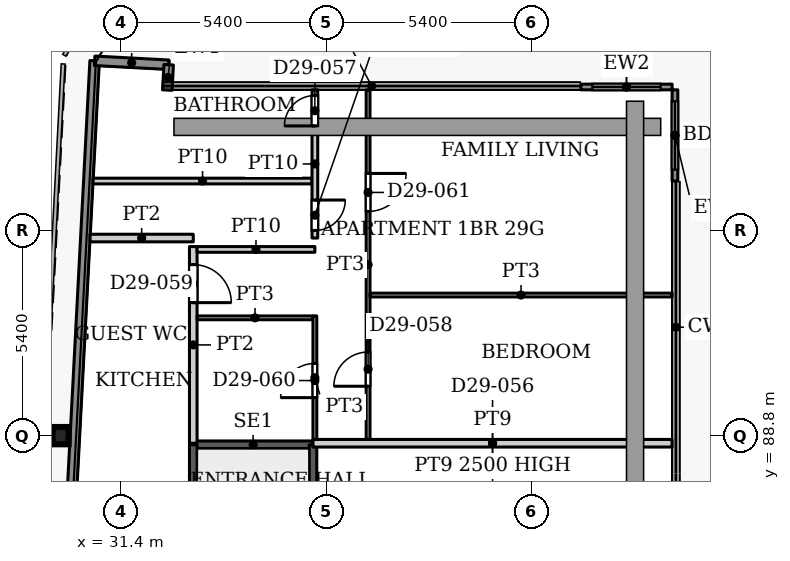
"""IFC4 building model, lengths in metres.
Left out: names, types, materials, properties, quantities, classifications, styles, units other than length and angle.
Written with IfcOpenShell. Run it as: python <this file> out.ifc"""

import sys

from ifc_helpers import new_model, si_unit, direction, frame, frame_2d, origin, origin_2d, place, context, subcontext, project, spatial, rectangle, i_section, extrude, source, transform, mapped, element, fill, save


model = new_model("IFC4")
c1 = context("Model", 3, precision=1e-05, world=origin(), true_north=direction((0.0, 1.0)))
c2 = subcontext(c1, "Body", "Model", "MODEL_VIEW")
j1 = project(units=[si_unit("LENGTHUNIT", "METRE"), si_unit("PLANEANGLEUNIT", "RADIAN")], contexts=[c1])
p1 = place(None, origin())
s1 = spatial("IfcSite", under=j1, at=p1, CompositionType="ELEMENT")
p2 = place(p1, origin())
s2 = spatial("IfcBuilding", under=s1, at=p2, CompositionType="ELEMENT")
p3 = place(p2, frame((0.0, 0.0, 125.3)))
s3 = spatial("IfcBuildingStorey", under=s2, at=p3, CompositionType="ELEMENT", Elevation=125.3)
p4 = place(p3, frame((29.811, 88.8, 0.0), z_axis=(0.0, 0.0, 1.0), x_axis=(1.0, 0.0, 0.0)))
e1 = element("IfcColumn", 1, at=p4, inside=s3, PredefinedType="COLUMN", context=c2, shape_type="SweptSolid", body=[
    extrude(i_section(OverallWidth=0.418, OverallDepth=0.455, WebThickness=0.042, FlangeThickness=0.068, FilletRadius=0.014, at=origin_2d()), origin(), (0.0, 0.0, 1.0), 3.9),
])
p5 = place(p3, frame((27.195, 31.969, 0.0), z_axis=(0.0, 0.0, 1.0), x_axis=(0.052554995867, 0.998618031286, 0.0)))
e2 = element("IfcWall", 2, at=p5, inside=s3, PredefinedType="SOLIDWALL", context=c2, shape_type="SweptSolid", body=[
    extrude(rectangle(XDim=66.787, YDim=0.25, at=frame_2d((33.394, 0.0))), origin(), (0.0, 0.0, 1.0), 3.75),
])
p6 = place(p3, frame((30.705, 98.664, 0.0), z_axis=(0.0, 0.0, 1.0), x_axis=(0.998577785791, -0.053314216913, 0.0)))
e3 = element("IfcWall", 3, at=p6, inside=s3, PredefinedType="SOLIDWALL", context=c2, shape_type="SweptSolid", body=[
    extrude(rectangle(XDim=1.951, YDim=0.25, at=frame_2d((0.975, 0.0))), origin(), (0.0, 0.0, 1.0), 3.75),
])
p7 = place(p3, frame((32.653, 98.56, 0.0), z_axis=(0.0, 0.0, 1.0), x_axis=(-0.054093451632, -0.998535877418, 0.0)))
e4 = element("IfcWall", 4, at=p7, inside=s3, PredefinedType="SOLIDWALL", context=c2, shape_type="SweptSolid", body=[
    extrude(rectangle(XDim=0.668, YDim=0.25, at=frame_2d((0.334, 0.0))), origin(), (0.0, 0.0, 1.0), 3.75),
])
p8 = place(p3, frame((43.5, 97.975, 0.0), z_axis=(0.0, 0.0, 1.0), x_axis=(1.0, 0.0, 0.0)))
e5 = element("IfcWall", 5, at=p8, inside=s3, PredefinedType="SOLIDWALL", context=c2, shape_type="SweptSolid", body=[
    extrude(rectangle(XDim=2.4, YDim=0.15, at=frame_2d((1.2, 0.0))), origin(), (0.0, 0.0, 1.0), 3.75),
])
p9 = place(p8, frame((0.3, 0.0, 0.0)))
e6 = element("IfcOpeningElement", 6, at=p9, cuts=e5, PredefinedType="OPENING", context=c2, shape_type="SweptSolid", body=[
    extrude(rectangle(XDim=1.8, YDim=2.4, at=frame_2d((0.9, 1.2))), frame((0.0, 0.085, 0.0), z_axis=(0.0, -1.0, 0.0), x_axis=(1.0, 0.0, 0.0)), (0.0, 0.0, 1.0), 0.17),
])
p10 = place(p3, frame((45.975, 97.9, 0.0), z_axis=(0.0, 0.0, 1.0), x_axis=(0.0, -1.0, 0.0)))
e7 = element("IfcWall", 7, at=p10, inside=s3, PredefinedType="SOLIDWALL", context=c2, shape_type="SweptSolid", body=[
    extrude(rectangle(XDim=2.4, YDim=0.15, at=frame_2d((1.2, 0.0))), origin(), (0.0, 0.0, 1.0), 3.75),
])
p11 = place(p10, frame((0.3, 0.0, 0.0)))
e8 = element("IfcOpeningElement", 8, at=p11, cuts=e7, PredefinedType="OPENING", context=c2, shape_type="SweptSolid", body=[
    extrude(rectangle(XDim=1.8, YDim=2.4, at=frame_2d((0.9, 1.2))), frame((0.0, 0.085, 0.0), z_axis=(0.0, -1.0, 0.0), x_axis=(1.0, 0.0, 0.0)), (0.0, 0.0, 1.0), 0.17),
])
p12 = place(p3, frame((33.3, 88.56, 0.0), z_axis=(0.0, 0.0, 1.0), x_axis=(1.0, 0.0, 0.0)))
e9 = element("IfcWall", 9, at=p12, inside=s3, PredefinedType="SHEAR", context=c2, shape_type="SweptSolid", body=[
    extrude(rectangle(XDim=3.15, YDim=0.2, at=frame_2d((1.575, 0.0))), origin(), (0.0, 0.0, 1.0), 3.9),
])
p13 = place(p3, frame((33.3, 79.4, 0.0), z_axis=(0.0, 0.0, 1.0), x_axis=(0.0, 1.0, 0.0)))
e10 = element("IfcWall", 10, at=p13, inside=s3, PredefinedType="SHEAR", context=c2, shape_type="SweptSolid", body=[
    extrude(rectangle(XDim=9.16, YDim=0.2, at=frame_2d((4.58, 0.0))), origin(), (0.0, 0.0, 1.0), 3.9),
])
p14 = place(p13, frame((0.35, 0.0, 0.0)))
e11 = element("IfcOpeningElement", 11, at=p14, cuts=e10, PredefinedType="OPENING", context=c2, shape_type="SweptSolid", body=[
    extrude(rectangle(XDim=1.1, YDim=2.2, at=frame_2d((0.55, 1.1))), frame((0.0, 0.11, 0.0), z_axis=(0.0, -1.0, 0.0), x_axis=(1.0, 0.0, 0.0)), (0.0, 0.0, 1.0), 0.22),
])
p15 = place(p3, frame((36.45, 79.4, 0.0), z_axis=(0.0, 0.0, 1.0), x_axis=(0.0, 1.0, 0.0)))
e12 = element("IfcWall", 12, at=p15, inside=s3, PredefinedType="SHEAR", context=c2, shape_type="SweptSolid", body=[
    extrude(rectangle(XDim=9.16, YDim=0.2, at=frame_2d((4.58, 0.0))), origin(), (0.0, 0.0, 1.0), 3.9),
])
p16 = place(p3, frame((30.664, 95.5, 0.0), z_axis=(0.0, 0.0, 1.0), x_axis=(1.0, 0.0, 0.0)))
e13 = element("IfcWall", 13, at=p16, inside=s3, PredefinedType="PARTITIONING", context=c2, shape_type="SweptSolid", body=[
    extrude(rectangle(XDim=5.761, YDim=0.15, at=frame_2d((2.88, 0.0))), origin(), (0.0, 0.0, 1.0), 3.6),
])
p17 = place(p3, frame((30.585, 94.0, 0.0), z_axis=(0.0, 0.0, 1.0), x_axis=(1.0, 0.0, 0.0)))
e14 = element("IfcWall", 14, at=p17, inside=s3, PredefinedType="PARTITIONING", context=c2, shape_type="SweptSolid", body=[
    extrude(rectangle(XDim=2.715, YDim=0.2, at=frame_2d((1.358, 0.0))), origin(), (0.0, 0.0, 1.0), 3.6),
])
p18 = place(p3, frame((33.3, 88.6, 0.0), z_axis=(0.0, 0.0, 1.0), x_axis=(0.0, 1.0, 0.0)))
e15 = element("IfcWall", 15, at=p18, inside=s3, PredefinedType="PARTITIONING", context=c2, shape_type="SweptSolid", body=[
    extrude(rectangle(XDim=5.175, YDim=0.2, at=frame_2d((2.587, 0.0))), origin(), (0.0, 0.0, 1.0), 3.6),
])
p19 = place(p18, frame((3.7, 0.0, 0.0)))
e16 = element("IfcOpeningElement", 16, at=p19, cuts=e15, PredefinedType="OPENING", context=c2, shape_type="SweptSolid", body=[
    extrude(rectangle(XDim=1.0, YDim=2.1, at=frame_2d((0.5, 1.05))), frame((0.0, 0.11, 0.0), z_axis=(0.0, -1.0, 0.0), x_axis=(1.0, 0.0, 0.0)), (0.0, 0.0, 1.0), 0.22),
])
p20 = place(p3, frame((33.4, 91.9, 0.0), z_axis=(0.0, 0.0, 1.0), x_axis=(1.0, 0.0, 0.0)))
e17 = element("IfcWall", 17, at=p20, inside=s3, PredefinedType="PARTITIONING", context=c2, shape_type="SweptSolid", body=[
    extrude(rectangle(XDim=3.05, YDim=0.1, at=frame_2d((1.525, 0.0))), origin(), (0.0, 0.0, 1.0), 3.6),
])
p21 = place(p3, frame((33.4, 93.7, 0.0), z_axis=(0.0, 0.0, 1.0), x_axis=(1.0, 0.0, 0.0)))
e18 = element("IfcWall", 18, at=p21, inside=s3, PredefinedType="PARTITIONING", context=c2, shape_type="SweptSolid", body=[
    extrude(rectangle(XDim=3.1, YDim=0.15, at=frame_2d((1.55, 0.0))), origin(), (0.0, 0.0, 1.0), 3.6),
])
p22 = place(p3, frame((36.45, 88.6, 0.0), z_axis=(0.0, 0.0, 1.0), x_axis=(1.0, 0.0, 0.0)))
e19 = element("IfcWall", 19, at=p22, inside=s3, PredefinedType="PARTITIONING", context=c2, shape_type="SweptSolid", body=[
    extrude(rectangle(XDim=9.45, YDim=0.2, at=frame_2d((4.725, 0.0))), origin(), (0.0, 0.0, 1.0), 2.5),
])
p23 = place(p3, frame((36.5, 88.7, 0.0), z_axis=(0.0, 0.0, 1.0), x_axis=(0.0, 1.0, 0.0)))
e20 = element("IfcWall", 20, at=p23, inside=s3, PredefinedType="PARTITIONING", context=c2, shape_type="SweptSolid", body=[
    extrude(rectangle(XDim=3.25, YDim=0.1, at=frame_2d((1.625, 0.0))), origin(), (0.0, 0.0, 1.0), 3.6),
])
p24 = place(p23, frame((1.1, 0.0, 0.0)))
e21 = element("IfcOpeningElement", 21, at=p24, cuts=e20, PredefinedType="OPENING", context=c2, shape_type="SweptSolid", body=[
    extrude(rectangle(XDim=0.9, YDim=2.1, at=frame_2d((0.45, 1.05))), frame((0.0, 0.06, 0.0), z_axis=(0.0, -1.0, 0.0), x_axis=(1.0, 0.0, 0.0)), (0.0, 0.0, 1.0), 0.12),
])
p25 = place(p3, frame((36.5, 94.0, 0.0), z_axis=(0.0, 0.0, 1.0), x_axis=(0.0, 1.0, 0.0)))
e22 = element("IfcWall", 22, at=p25, inside=s3, PredefinedType="PARTITIONING", context=c2, shape_type="SweptSolid", body=[
    extrude(rectangle(XDim=3.9, YDim=0.15, at=frame_2d((1.95, 0.0))), origin(), (0.0, 0.0, 1.0), 3.6),
])
p26 = place(p25, frame((2.95, 0.0, 0.0)))
e23 = element("IfcOpeningElement", 23, at=p26, cuts=e22, PredefinedType="OPENING", context=c2, shape_type="SweptSolid", body=[
    extrude(rectangle(XDim=0.8, YDim=2.1, at=frame_2d((0.4, 1.05))), frame((0.0, 0.085, 0.0), z_axis=(0.0, -1.0, 0.0), x_axis=(1.0, 0.0, 0.0)), (0.0, 0.0, 1.0), 0.17),
])
p27 = place(p25, frame((0.2, 0.0, 0.0)))
e24 = element("IfcOpeningElement", 24, at=p27, cuts=e22, PredefinedType="OPENING", context=c2, shape_type="SweptSolid", body=[
    extrude(rectangle(XDim=0.8, YDim=2.1, at=frame_2d((0.4, 1.05))), frame((0.0, 0.085, 0.0), z_axis=(0.0, -1.0, 0.0), x_axis=(1.0, 0.0, 0.0)), (0.0, 0.0, 1.0), 0.17),
])
p28 = place(p3, frame((37.9, 88.7, 0.0), z_axis=(0.0, 0.0, 1.0), x_axis=(0.0, 1.0, 0.0)))
e25 = element("IfcWall", 25, at=p28, inside=s3, PredefinedType="PARTITIONING", context=c2, shape_type="SweptSolid", body=[
    extrude(rectangle(XDim=9.2, YDim=0.1, at=frame_2d((4.6, 0.0))), origin(), (0.0, 0.0, 1.0), 3.6),
])
p29 = place(p28, frame((1.4, 0.0, 0.0)))
e26 = element("IfcOpeningElement", 26, at=p29, cuts=e25, PredefinedType="OPENING", context=c2, shape_type="SweptSolid", body=[
    extrude(rectangle(XDim=0.9, YDim=2.1, at=frame_2d((0.45, 1.05))), frame((0.0, 0.06, 0.0), z_axis=(0.0, -1.0, 0.0), x_axis=(1.0, 0.0, 0.0)), (0.0, 0.0, 1.0), 0.12),
])
p30 = place(p28, frame((6.0, 0.0, 0.0)))
e27 = element("IfcOpeningElement", 27, at=p30, cuts=e25, PredefinedType="OPENING", context=c2, shape_type="SweptSolid", body=[
    extrude(rectangle(XDim=1.0, YDim=2.1, at=frame_2d((0.5, 1.05))), frame((0.0, 0.06, 0.0), z_axis=(0.0, -1.0, 0.0), x_axis=(1.0, 0.0, 0.0)), (0.0, 0.0, 1.0), 0.12),
])
p31 = place(p3, frame((37.95, 92.5, 0.0), z_axis=(0.0, 0.0, 1.0), x_axis=(1.0, 0.0, 0.0)))
e28 = element("IfcWall", 28, at=p31, inside=s3, PredefinedType="PARTITIONING", context=c2, shape_type="SweptSolid", body=[
    extrude(rectangle(XDim=7.95, YDim=0.1, at=frame_2d((3.975, 0.0))), origin(), (0.0, 0.0, 1.0), 3.6),
])
m1 = source(origin(), c2, "Body", "SweptSolid", [
    extrude(rectangle(XDim=1.8, YDim=2.4, at=frame_2d((0.9, 1.2))), frame((0.0, 0.025, 0.0), z_axis=(0.0, -1.0, 0.0), x_axis=(1.0, 0.0, 0.0)), (0.0, 0.0, 1.0), 0.05),
])
p32 = place(p9, origin())
e29 = element("IfcDoor", 29, at=p32, inside=s3, OperationType="SLIDING_TO_LEFT", PredefinedType="DOOR", context=c2, shape_type="MappedRepresentation", body=[
    mapped(m1, transform((0.0, 0.0, 0.0), x_axis=(1.0, 0.0, 0.0), y_axis=(0.0, 1.0, 0.0), z_axis=(0.0, 0.0, 1.0), scale=1.0)),
])
fill(e6, e29)
p33 = place(p11, origin())
e30 = element("IfcDoor", 30, at=p33, inside=s3, OperationType="SLIDING_TO_LEFT", PredefinedType="DOOR", context=c2, shape_type="MappedRepresentation", body=[
    mapped(m1, transform((0.0, 0.0, 0.0), x_axis=(1.0, 0.0, 0.0), y_axis=(0.0, 1.0, 0.0), z_axis=(0.0, 0.0, 1.0), scale=1.0)),
])
fill(e8, e30)
m2 = source(origin(), c2, "Body", "SweptSolid", [
    extrude(rectangle(XDim=0.8, YDim=2.1, at=frame_2d((0.4, 1.05))), frame((0.0, 0.025, 0.0), z_axis=(0.0, -1.0, 0.0), x_axis=(1.0, 0.0, 0.0)), (0.0, 0.0, 1.0), 0.05),
])
p34 = place(p26, origin())
e31 = element("IfcDoor", 31, at=p34, inside=s3, OperationType="SINGLE_SWING_LEFT", PredefinedType="DOOR", context=c2, shape_type="MappedRepresentation", body=[
    mapped(m2, transform((0.0, 0.0, 0.0), x_axis=(1.0, 0.0, 0.0), y_axis=(0.0, 1.0, 0.0), z_axis=(0.0, 0.0, 1.0), scale=1.0)),
])
fill(e23, e31)
m3 = source(origin(), c2, "Body", "SweptSolid", [
    extrude(rectangle(XDim=0.9, YDim=2.1, at=frame_2d((0.45, 1.05))), frame((0.0, 0.025, 0.0), z_axis=(0.0, -1.0, 0.0), x_axis=(1.0, 0.0, 0.0)), (0.0, 0.0, 1.0), 0.05),
])
p35 = place(p29, origin())
e32 = element("IfcDoor", 32, at=p35, inside=s3, OperationType="SINGLE_SWING_LEFT", PredefinedType="DOOR", context=c2, shape_type="MappedRepresentation", body=[
    mapped(m3, transform((0.0, 0.0, 0.0), x_axis=(1.0, 0.0, 0.0), y_axis=(0.0, 1.0, 0.0), z_axis=(0.0, 0.0, 1.0), scale=1.0)),
])
fill(e26, e32)
m4 = source(origin(), c2, "Body", "SweptSolid", [
    extrude(rectangle(XDim=1.0, YDim=2.1, at=frame_2d((0.5, 1.05))), frame((0.0, 0.025, 0.0), z_axis=(0.0, -1.0, 0.0), x_axis=(1.0, 0.0, 0.0)), (0.0, 0.0, 1.0), 0.05),
])
p36 = place(p19, origin())
e33 = element("IfcDoor", 33, at=p36, inside=s3, OperationType="SINGLE_SWING_RIGHT", PredefinedType="DOOR", context=c2, shape_type="MappedRepresentation", body=[
    mapped(m4, transform((0.0, 0.0, 0.0), x_axis=(1.0, 0.0, 0.0), y_axis=(0.0, 1.0, 0.0), z_axis=(0.0, 0.0, 1.0), scale=1.0)),
])
fill(e16, e33)
p37 = place(p24, origin())
e34 = element("IfcDoor", 34, at=p37, inside=s3, OperationType="SINGLE_SWING_LEFT", PredefinedType="DOOR", context=c2, shape_type="MappedRepresentation", body=[
    mapped(m3, transform((0.0, 0.0, 0.0), x_axis=(1.0, 0.0, 0.0), y_axis=(0.0, 1.0, 0.0), z_axis=(0.0, 0.0, 1.0), scale=1.0)),
])
fill(e21, e34)
m5 = source(origin(), c2, "Body", "SweptSolid", [
    extrude(rectangle(XDim=1.0, YDim=2.1, at=frame_2d((0.5, 1.05))), frame((0.0, 0.025, 0.0), z_axis=(0.0, -1.0, 0.0), x_axis=(1.0, 0.0, 0.0)), (0.0, 0.0, 1.0), 0.05),
])
p38 = place(p30, origin())
e35 = element("IfcDoor", 35, at=p38, inside=s3, OperationType="SINGLE_SWING_RIGHT", PredefinedType="DOOR", context=c2, shape_type="MappedRepresentation", body=[
    mapped(m5, transform((0.0, 0.0, 0.0), x_axis=(1.0, 0.0, 0.0), y_axis=(0.0, 1.0, 0.0), z_axis=(0.0, 0.0, 1.0), scale=1.0)),
])
fill(e27, e35)
p39 = place(p27, origin())
e36 = element("IfcDoor", 36, at=p39, inside=s3, OperationType="SINGLE_SWING_RIGHT", PredefinedType="DOOR", context=c2, shape_type="MappedRepresentation", body=[
    mapped(m2, transform((0.0, 0.0, 0.0), x_axis=(1.0, 0.0, 0.0), y_axis=(0.0, 1.0, 0.0), z_axis=(0.0, 0.0, 1.0), scale=1.0)),
])
fill(e24, e36)
save(model, sys.argv[1])
